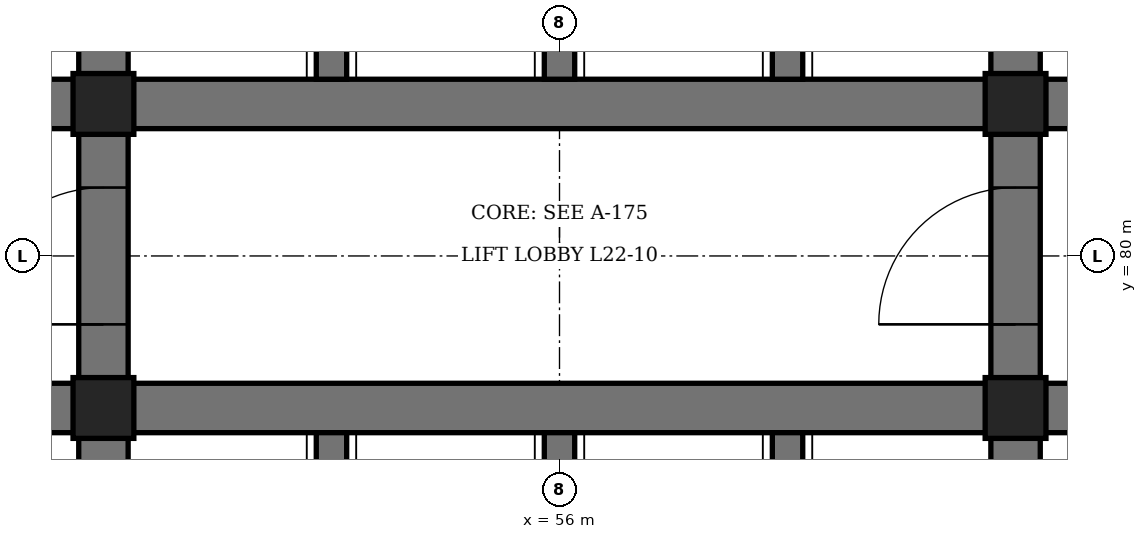
"""IFC4 building model, lengths in metres.
Left out: names, types, materials, properties, quantities, classifications, styles, units other than length and angle.
Written with IfcOpenShell. Run it as: python <this file> out.ifc"""

import sys

from ifc_helpers import new_model, si_unit, direction, frame, frame_2d, origin, origin_2d, place, context, subcontext, project, spatial, rectangle, hollow_rectangle, extrude, element, fill, save


model = new_model("IFC4")
c1 = context("Model", 3, precision=1e-05, world=origin(), true_north=direction((0.0, 1.0)))
c2 = subcontext(c1, "Body", "Model", "MODEL_VIEW")
j1 = project(units=[si_unit("LENGTHUNIT", "METRE"), si_unit("PLANEANGLEUNIT", "RADIAN")], contexts=[c1])
p1 = place(None, origin())
s1 = spatial("IfcSite", under=j1, at=p1, CompositionType="ELEMENT")
p2 = place(p1, origin())
s2 = spatial("IfcBuilding", under=s1, at=p2, CompositionType="ELEMENT")
p3 = place(p2, frame((0.0, 0.0, 102.1)))
s3 = spatial("IfcBuildingStorey", under=s2, at=p3, CompositionType="ELEMENT", Elevation=102.1)
p4 = place(p3, frame((50.0, 71.6, 0.0), z_axis=(0.0, 0.0, 1.0), x_axis=(0.0, 1.0, 0.0)))
e1 = element("IfcWall", 1, at=p4, inside=s3, PredefinedType="SHEAR", context=c2, shape_type="SweptSolid", body=[
    extrude(rectangle(XDim=16.8, YDim=0.65, at=frame_2d((8.4, 0.0))), origin(), (0.0, 0.0, 1.0), 6.0),
])
p5 = place(p4, frame((7.5, 0.0, 0.0)))
e2 = element("IfcOpeningElement", 2, at=p5, cuts=e1, PredefinedType="OPENING", context=c2, shape_type="SweptSolid", body=[
    extrude(rectangle(XDim=1.8, YDim=2.4, at=frame_2d((0.9, 1.2))), frame((0.0, 0.335, 0.0), z_axis=(0.0, -1.0, 0.0), x_axis=(1.0, 0.0, 0.0)), (0.0, 0.0, 1.0), 0.67),
])
p6 = place(p3, frame((62.0, 71.6, 0.0), z_axis=(0.0, 0.0, 1.0), x_axis=(0.0, 1.0, 0.0)))
e3 = element("IfcWall", 3, at=p6, inside=s3, PredefinedType="SHEAR", context=c2, shape_type="SweptSolid", body=[
    extrude(rectangle(XDim=16.8, YDim=0.65, at=frame_2d((8.4, 0.0))), origin(), (0.0, 0.0, 1.0), 6.0),
])
p7 = place(p6, frame((7.5, 0.0, 0.0)))
e4 = element("IfcOpeningElement", 4, at=p7, cuts=e3, PredefinedType="OPENING", context=c2, shape_type="SweptSolid", body=[
    extrude(rectangle(XDim=1.8, YDim=2.4, at=frame_2d((0.9, 1.2))), frame((0.0, 0.335, 0.0), z_axis=(0.0, -1.0, 0.0), x_axis=(1.0, 0.0, 0.0)), (0.0, 0.0, 1.0), 0.67),
])
p8 = place(p3, frame((44.6, 78.0, 0.0), z_axis=(0.0, 0.0, 1.0), x_axis=(1.0, 0.0, 0.0)))
e5 = element("IfcWall", 5, at=p8, inside=s3, PredefinedType="SHEAR", context=c2, shape_type="SweptSolid", body=[
    extrude(rectangle(XDim=5.075, YDim=0.65, at=frame_2d((2.538, 0.0))), origin(), (0.0, 0.0, 1.0), 6.0),
])
p9 = place(p8, frame((1.8, 0.0, 0.0)))
e6 = element("IfcOpeningElement", 6, at=p9, cuts=e5, PredefinedType="OPENING", context=c2, shape_type="SweptSolid", body=[
    extrude(rectangle(XDim=1.2, YDim=2.1, at=frame_2d((0.6, 1.05))), frame((0.0, 0.335, 0.0), z_axis=(0.0, -1.0, 0.0), x_axis=(1.0, 0.0, 0.0)), (0.0, 0.0, 1.0), 0.67),
])
p10 = place(p3, frame((44.6, 82.0, 0.0), z_axis=(0.0, 0.0, 1.0), x_axis=(1.0, 0.0, 0.0)))
e7 = element("IfcWall", 7, at=p10, inside=s3, PredefinedType="SHEAR", context=c2, shape_type="SweptSolid", body=[
    extrude(rectangle(XDim=5.075, YDim=0.65, at=frame_2d((2.538, 0.0))), origin(), (0.0, 0.0, 1.0), 6.0),
])
p11 = place(p10, frame((0.7, 0.0, 0.0)))
e8 = element("IfcOpeningElement", 8, at=p11, cuts=e7, PredefinedType="OPENING", context=c2, shape_type="SweptSolid", body=[
    extrude(rectangle(XDim=0.9, YDim=2.1, at=frame_2d((0.45, 1.05))), frame((0.0, 0.335, 0.0), z_axis=(0.0, -1.0, 0.0), x_axis=(1.0, 0.0, 0.0)), (0.0, 0.0, 1.0), 0.67),
])
p12 = place(p3, frame((62.325, 78.0, 0.0), z_axis=(0.0, 0.0, 1.0), x_axis=(1.0, 0.0, 0.0)))
e9 = element("IfcWall", 9, at=p12, inside=s3, PredefinedType="SHEAR", context=c2, shape_type="SweptSolid", body=[
    extrude(rectangle(XDim=5.075, YDim=0.65, at=frame_2d((2.538, 0.0))), origin(), (0.0, 0.0, 1.0), 6.0),
])
p13 = place(p12, frame((2.075, 0.0, 0.0)))
e10 = element("IfcOpeningElement", 10, at=p13, cuts=e9, PredefinedType="OPENING", context=c2, shape_type="SweptSolid", body=[
    extrude(rectangle(XDim=1.2, YDim=2.1, at=frame_2d((0.6, 1.05))), frame((0.0, 0.335, 0.0), z_axis=(0.0, -1.0, 0.0), x_axis=(1.0, 0.0, 0.0)), (0.0, 0.0, 1.0), 0.67),
])
p14 = place(p3, frame((62.325, 82.0, 0.0), z_axis=(0.0, 0.0, 1.0), x_axis=(1.0, 0.0, 0.0)))
e11 = element("IfcWall", 11, at=p14, inside=s3, PredefinedType="SHEAR", context=c2, shape_type="SweptSolid", body=[
    extrude(rectangle(XDim=5.075, YDim=0.65, at=frame_2d((2.538, 0.0))), origin(), (0.0, 0.0, 1.0), 6.0),
])
p15 = place(p14, frame((2.075, 0.0, 0.0)))
e12 = element("IfcOpeningElement", 12, at=p15, cuts=e11, PredefinedType="OPENING", context=c2, shape_type="SweptSolid", body=[
    extrude(rectangle(XDim=1.2, YDim=2.1, at=frame_2d((0.6, 1.05))), frame((0.0, 0.335, 0.0), z_axis=(0.0, -1.0, 0.0), x_axis=(1.0, 0.0, 0.0)), (0.0, 0.0, 1.0), 0.67),
])
for number, where, z_axis, x_axis in (
    (13, (50.325, 78.0, 0.0), (0.0, 0.0, 1.0), (1.0, 0.0, 0.0)),
    (14, (50.325, 82.0, 0.0), (0.0, 0.0, 1.0), (1.0, 0.0, 0.0)),
):
    element("IfcWall", number, at=place(p3, frame(where, z_axis=z_axis, x_axis=x_axis)), inside=s3, PredefinedType="SHEAR", context=c2, shape_type="SweptSolid", body=[
        extrude(rectangle(XDim=11.35, YDim=0.65, at=frame_2d((5.675, 0.0))), origin(), (0.0, 0.0, 1.0), 6.0),
    ])
p16 = place(p3, frame((53.0, 74.2, 0.0), z_axis=(0.0, 0.0, 1.0), x_axis=(0.0, 1.0, 0.0)))
e15 = element("IfcWall", 15, at=p16, inside=s3, PredefinedType="SHEAR", context=c2, shape_type="SweptSolid", body=[
    extrude(rectangle(XDim=3.475, YDim=0.4, at=frame_2d((1.738, 0.0))), origin(), (0.0, 0.0, 1.0), 6.0),
])
p17 = place(p3, frame((53.0, 82.325, 0.0), z_axis=(0.0, 0.0, 1.0), x_axis=(0.0, 1.0, 0.0)))
e16 = element("IfcWall", 16, at=p17, inside=s3, PredefinedType="SHEAR", context=c2, shape_type="SweptSolid", body=[
    extrude(rectangle(XDim=3.35, YDim=0.4, at=frame_2d((1.675, 0.0))), origin(), (0.0, 0.0, 1.0), 6.0),
])
p18 = place(p3, frame((56.0, 74.2, 0.0), z_axis=(0.0, 0.0, 1.0), x_axis=(0.0, 1.0, 0.0)))
e17 = element("IfcWall", 17, at=p18, inside=s3, PredefinedType="SHEAR", context=c2, shape_type="SweptSolid", body=[
    extrude(rectangle(XDim=3.475, YDim=0.4, at=frame_2d((1.738, 0.0))), origin(), (0.0, 0.0, 1.0), 6.0),
])
p19 = place(p3, frame((56.0, 82.325, 0.0), z_axis=(0.0, 0.0, 1.0), x_axis=(0.0, 1.0, 0.0)))
e18 = element("IfcWall", 18, at=p19, inside=s3, PredefinedType="SHEAR", context=c2, shape_type="SweptSolid", body=[
    extrude(rectangle(XDim=3.35, YDim=0.4, at=frame_2d((1.675, 0.0))), origin(), (0.0, 0.0, 1.0), 6.0),
])
p20 = place(p3, frame((59.0, 74.2, 0.0), z_axis=(0.0, 0.0, 1.0), x_axis=(0.0, 1.0, 0.0)))
e19 = element("IfcWall", 19, at=p20, inside=s3, PredefinedType="SHEAR", context=c2, shape_type="SweptSolid", body=[
    extrude(rectangle(XDim=3.475, YDim=0.4, at=frame_2d((1.738, 0.0))), origin(), (0.0, 0.0, 1.0), 6.0),
])
p21 = place(p3, frame((59.0, 82.325, 0.0), z_axis=(0.0, 0.0, 1.0), x_axis=(0.0, 1.0, 0.0)))
e20 = element("IfcWall", 20, at=p21, inside=s3, PredefinedType="SHEAR", context=c2, shape_type="SweptSolid", body=[
    extrude(rectangle(XDim=3.35, YDim=0.4, at=frame_2d((1.675, 0.0))), origin(), (0.0, 0.0, 1.0), 6.0),
])
for number, where, z_axis, x_axis in (
    (21, (50.0, 78.0, 0.0), (0.0, 0.0, 1.0), (1.0, 0.0, 0.0)),
    (22, (50.0, 82.0, 0.0), (0.0, 0.0, 1.0), (1.0, 0.0, 0.0)),
    (23, (62.0, 78.0, 0.0), (0.0, 0.0, 1.0), (1.0, 0.0, 0.0)),
    (24, (62.0, 82.0, 0.0), (0.0, 0.0, 1.0), (1.0, 0.0, 0.0)),
):
    element("IfcColumn", number, at=place(p3, frame(where, z_axis=z_axis, x_axis=x_axis)), inside=s3, PredefinedType="COLUMN", context=c2, shape_type="SweptSolid", body=[
        extrude(hollow_rectangle(XDim=0.8, YDim=0.8, WallThickness=0.1, at=origin_2d()), origin(), (0.0, 0.0, 1.0), 6.0),
    ])
p22 = place(p5, origin())
e25 = element("IfcDoor", 25, at=p22, inside=s3, OperationType="DOUBLE_DOOR_SINGLE_SWING", PredefinedType="DOOR", context=c2, shape_type="SweptSolid", body=[
    extrude(rectangle(XDim=1.8, YDim=2.4, at=frame_2d((0.9, 1.2))), frame((0.0, 0.325, 0.0), z_axis=(0.0, -1.0, 0.0), x_axis=(1.0, 0.0, 0.0)), (0.0, 0.0, 1.0), 0.649),
])
fill(e2, e25)
p23 = place(p7, origin())
e26 = element("IfcDoor", 26, at=p23, inside=s3, OperationType="DOUBLE_DOOR_SINGLE_SWING", PredefinedType="DOOR", context=c2, shape_type="SweptSolid", body=[
    extrude(rectangle(XDim=1.8, YDim=2.4, at=frame_2d((0.9, 1.2))), frame((0.0, 0.325, 0.0), z_axis=(0.0, -1.0, 0.0), x_axis=(1.0, 0.0, 0.0)), (0.0, 0.0, 1.0), 0.649),
])
fill(e4, e26)
save(model, sys.argv[1])
